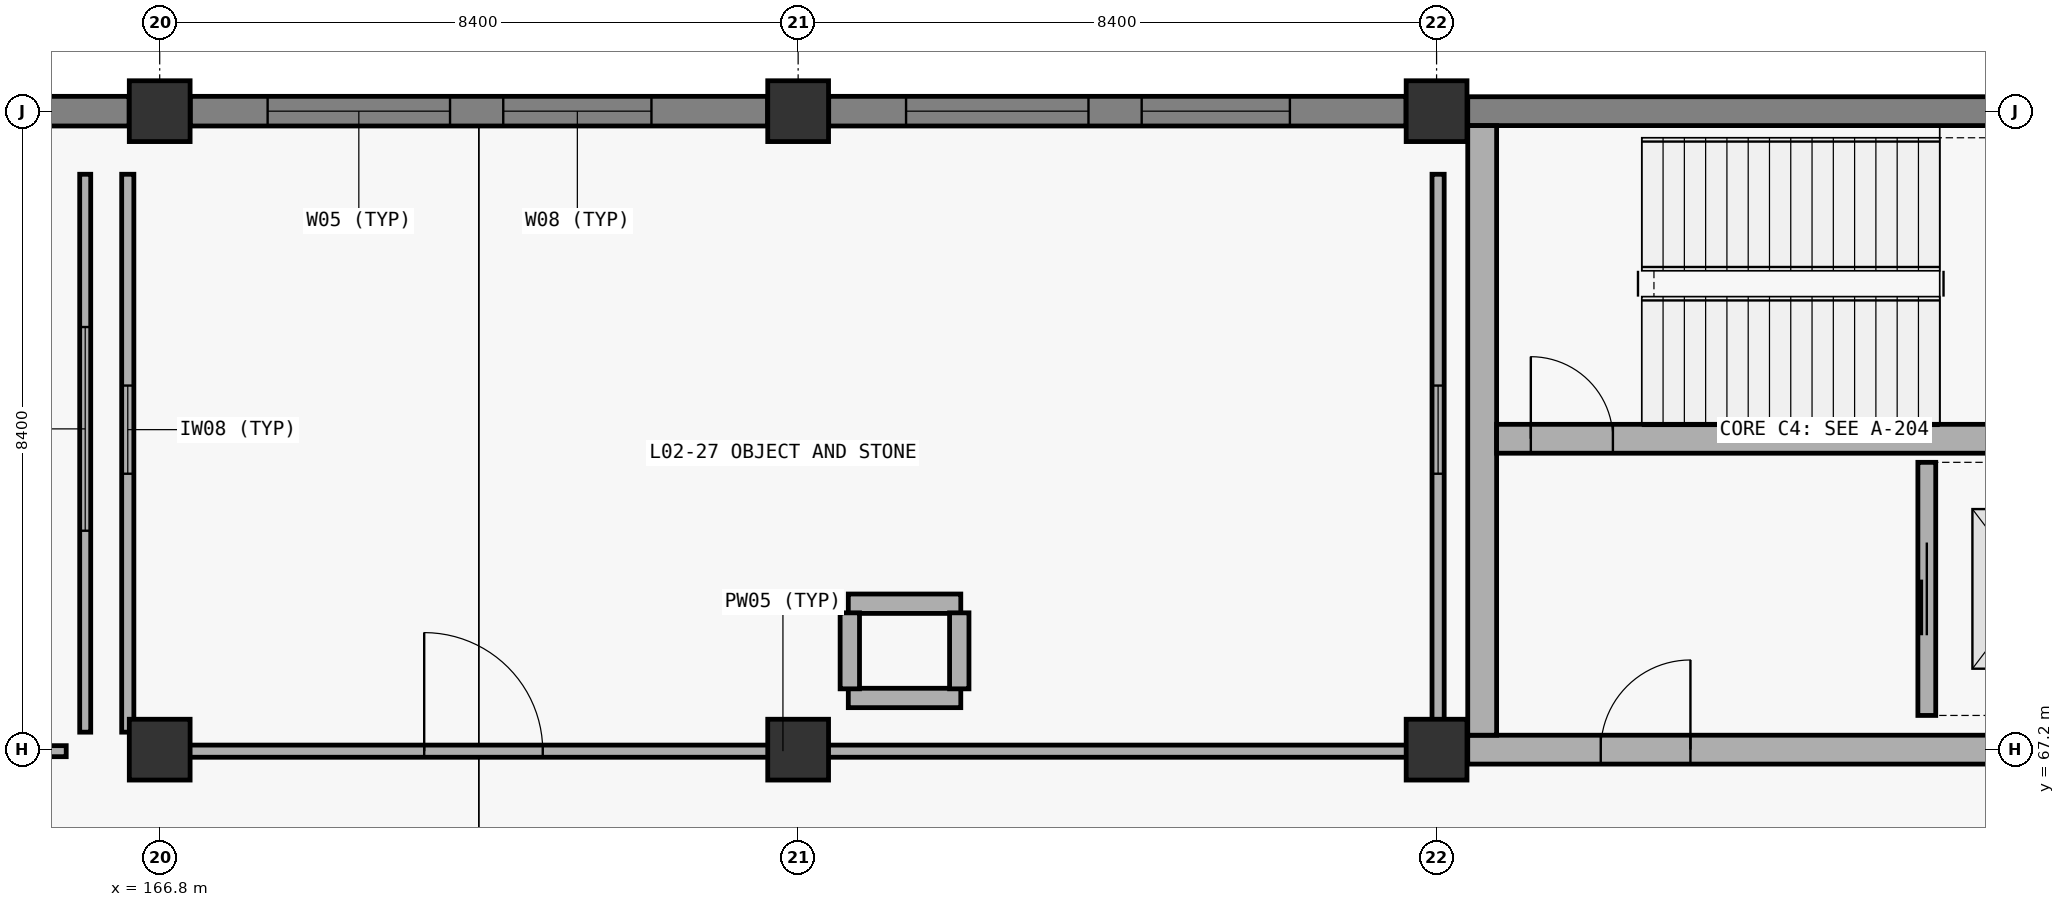
"""IFC4 building model, lengths in metres.
Left out: names, types, materials, properties, quantities, classifications, styles, units other than length and angle.
Written with IfcOpenShell. Run it as: python <this file> out.ifc"""

import sys

from ifc_helpers import new_model, si_unit, direction, frame, frame_2d, origin, origin_2d, place, context, subcontext, project, spatial, rectangle, extrude, element, fill, save


model = new_model("IFC4")
c1 = context("Model", 3, precision=1e-05, world=origin(), true_north=direction((0.0, 1.0)))
c2 = subcontext(c1, "Body", "Model", "MODEL_VIEW")
j1 = project(units=[si_unit("LENGTHUNIT", "METRE"), si_unit("PLANEANGLEUNIT", "RADIAN")], contexts=[c1])
p1 = place(None, origin())
s1 = spatial("IfcSite", under=j1, at=p1, CompositionType="ELEMENT")
p2 = place(p1, origin())
s2 = spatial("IfcBuilding", under=s1, at=p2, CompositionType="ELEMENT")
p3 = place(p2, frame((0.0, 0.0, 10.5)))
s3 = spatial("IfcBuildingStorey", under=s2, at=p3, CompositionType="ELEMENT", Elevation=10.5)
for number, where, z_axis, x_axis in (
    (1, (166.8, 67.2, 0.0), (0.0, 0.0, 1.0), (1.0, 0.0, 0.0)),
    (2, (166.8, 75.6, 0.0), (0.0, 0.0, 1.0), (1.0, 0.0, 0.0)),
    (3, (175.2, 67.2, 0.0), (0.0, 0.0, 1.0), (1.0, 0.0, 0.0)),
    (4, (175.2, 75.6, 0.0), (0.0, 0.0, 1.0), (1.0, 0.0, 0.0)),
    (5, (183.6, 67.2, 0.0), (0.0, 0.0, 1.0), (1.0, 0.0, 0.0)),
    (6, (183.6, 75.6, 0.0), (0.0, 0.0, 1.0), (1.0, 0.0, 0.0)),
):
    element("IfcColumn", number, at=place(p3, frame(where, z_axis=z_axis, x_axis=x_axis)), inside=s3, PredefinedType="COLUMN", context=c2, shape_type="SweptSolid", body=[
        extrude(rectangle(XDim=0.8, YDim=0.8, at=origin_2d()), origin(), (0.0, 0.0, 1.0), 5.1),
    ])
p4 = place(p3, frame((184.01, 67.2, 0.0), z_axis=(0.0, 0.0, 1.0), x_axis=(1.0, 0.0, 0.0)))
e7 = element("IfcWall", 7, at=p4, inside=s3, PredefinedType="SHEAR", context=c2, shape_type="SweptSolid", body=[
    extrude(rectangle(XDim=9.38, YDim=0.38, at=frame_2d((4.69, 0.0))), origin(), (0.0, 0.0, 1.0), 5.1),
])
p5 = place(p4, frame((1.75, 0.0, 0.0)))
e8 = element("IfcOpeningElement", 8, at=p5, cuts=e7, PredefinedType="OPENING", context=c2, shape_type="SweptSolid", body=[
    extrude(rectangle(XDim=1.18, YDim=2.24, at=frame_2d((0.59, 1.12))), frame((0.0, 0.2, 0.0), z_axis=(0.0, -1.0, 0.0), x_axis=(1.0, 0.0, 0.0)), (0.0, 0.0, 1.0), 0.4),
])
p6 = place(p3, frame((184.01, 75.6, 0.0), z_axis=(0.0, 0.0, 1.0), x_axis=(1.0, 0.0, 0.0)))
e9 = element("IfcWall", 9, at=p6, inside=s3, PredefinedType="SHEAR", context=c2, shape_type="SweptSolid", body=[
    extrude(rectangle(XDim=9.38, YDim=0.38, at=frame_2d((4.69, 0.0))), origin(), (0.0, 0.0, 1.0), 5.1),
])
p7 = place(p3, frame((184.2, 67.39, 0.0), z_axis=(0.0, 0.0, 1.0), x_axis=(0.0, 1.0, 0.0)))
e10 = element("IfcWall", 10, at=p7, inside=s3, PredefinedType="SHEAR", context=c2, shape_type="SweptSolid", body=[
    extrude(rectangle(XDim=8.02, YDim=0.38, at=frame_2d((4.01, 0.0))), origin(), (0.0, 0.0, 1.0), 5.1),
])
p8 = place(p3, frame((184.39, 71.29, 0.0), z_axis=(0.0, 0.0, 1.0), x_axis=(1.0, 0.0, 0.0)))
e11 = element("IfcWall", 11, at=p8, inside=s3, PredefinedType="SHEAR", context=c2, shape_type="SweptSolid", body=[
    extrude(rectangle(XDim=8.62, YDim=0.38, at=frame_2d((4.31, 0.0))), origin(), (0.0, 0.0, 1.0), 5.1),
])
p9 = place(p8, frame((0.45, 0.0, 0.0)))
e12 = element("IfcOpeningElement", 12, at=p9, cuts=e11, PredefinedType="OPENING", context=c2, shape_type="SweptSolid", body=[
    extrude(rectangle(XDim=1.08, YDim=2.18, at=frame_2d((0.54, 1.09))), frame((0.0, 0.2, 0.0), z_axis=(0.0, -1.0, 0.0), x_axis=(1.0, 0.0, 0.0)), (0.0, 0.0, 1.0), 0.4),
])
p10 = place(p3, frame((158.802, 75.6, 0.0), z_axis=(0.0, 0.0, 1.0), x_axis=(1.0, 0.0, 0.0)))
e13 = element("IfcWall", 13, at=p10, inside=s3, PredefinedType="SOLIDWALL", context=c2, shape_type="SweptSolid", body=[
    extrude(rectangle(XDim=7.596, YDim=0.39, at=frame_2d((3.798, 0.0))), origin(), (0.0, 0.0, 1.0), 4.35),
])
p11 = place(p10, frame((1.018, 0.0, 0.85)))
e14 = element("IfcOpeningElement", 14, at=p11, cuts=e13, PredefinedType="OPENING", context=c2, shape_type="SweptSolid", body=[
    extrude(rectangle(XDim=2.4, YDim=2.15, at=frame_2d((1.2, 1.075))), frame((0.0, 0.205, 0.0), z_axis=(0.0, -1.0, 0.0), x_axis=(1.0, 0.0, 0.0)), (0.0, 0.0, 1.0), 0.41),
])
p12 = place(p10, frame((4.118, 0.0, 0.85)))
e15 = element("IfcOpeningElement", 15, at=p12, cuts=e13, PredefinedType="OPENING", context=c2, shape_type="SweptSolid", body=[
    extrude(rectangle(XDim=1.95, YDim=2.3, at=frame_2d((0.975, 1.15))), frame((0.0, 0.205, 0.0), z_axis=(0.0, -1.0, 0.0), x_axis=(1.0, 0.0, 0.0)), (0.0, 0.0, 1.0), 0.41),
])
p13 = place(p3, frame((167.202, 75.6, 0.0), z_axis=(0.0, 0.0, 1.0), x_axis=(1.0, 0.0, 0.0)))
e16 = element("IfcWall", 16, at=p13, inside=s3, PredefinedType="SOLIDWALL", context=c2, shape_type="SweptSolid", body=[
    extrude(rectangle(XDim=7.596, YDim=0.39, at=frame_2d((3.798, 0.0))), origin(), (0.0, 0.0, 1.0), 4.1),
])
p14 = place(p13, frame((1.018, 0.0, 0.85)))
e17 = element("IfcOpeningElement", 17, at=p14, cuts=e16, PredefinedType="OPENING", context=c2, shape_type="SweptSolid", body=[
    extrude(rectangle(XDim=2.4, YDim=2.15, at=frame_2d((1.2, 1.075))), frame((0.0, 0.205, 0.0), z_axis=(0.0, -1.0, 0.0), x_axis=(1.0, 0.0, 0.0)), (0.0, 0.0, 1.0), 0.41),
])
p15 = place(p13, frame((4.118, 0.0, 0.85)))
e18 = element("IfcOpeningElement", 18, at=p15, cuts=e16, PredefinedType="OPENING", context=c2, shape_type="SweptSolid", body=[
    extrude(rectangle(XDim=1.95, YDim=2.3, at=frame_2d((0.975, 1.15))), frame((0.0, 0.205, 0.0), z_axis=(0.0, -1.0, 0.0), x_axis=(1.0, 0.0, 0.0)), (0.0, 0.0, 1.0), 0.41),
])
p16 = place(p3, frame((175.602, 75.6, 0.0), z_axis=(0.0, 0.0, 1.0), x_axis=(1.0, 0.0, 0.0)))
e19 = element("IfcWall", 19, at=p16, inside=s3, PredefinedType="SOLIDWALL", context=c2, shape_type="SweptSolid", body=[
    extrude(rectangle(XDim=7.596, YDim=0.39, at=frame_2d((3.798, 0.0))), origin(), (0.0, 0.0, 1.0), 4.35),
])
p17 = place(p16, frame((1.018, 0.0, 0.85)))
e20 = element("IfcOpeningElement", 20, at=p17, cuts=e19, PredefinedType="OPENING", context=c2, shape_type="SweptSolid", body=[
    extrude(rectangle(XDim=2.4, YDim=2.15, at=frame_2d((1.2, 1.075))), frame((0.0, 0.205, 0.0), z_axis=(0.0, -1.0, 0.0), x_axis=(1.0, 0.0, 0.0)), (0.0, 0.0, 1.0), 0.41),
])
p18 = place(p16, frame((4.118, 0.0, 0.85)))
e21 = element("IfcOpeningElement", 21, at=p18, cuts=e19, PredefinedType="OPENING", context=c2, shape_type="SweptSolid", body=[
    extrude(rectangle(XDim=1.95, YDim=2.3, at=frame_2d((0.975, 1.15))), frame((0.0, 0.205, 0.0), z_axis=(0.0, -1.0, 0.0), x_axis=(1.0, 0.0, 0.0)), (0.0, 0.0, 1.0), 0.41),
])
p19 = place(p3, frame((190.05, 67.65, 0.0), z_axis=(0.0, 0.0, 1.0), x_axis=(0.0, 1.0, 0.0)))
e22 = element("IfcWall", 22, at=p19, inside=s3, PredefinedType="PARTITIONING", context=c2, shape_type="SweptSolid", body=[
    extrude(rectangle(XDim=3.33, YDim=0.235, at=frame_2d((1.665, 0.0))), origin(), (0.0, 0.0, 1.0), 4.72),
])
p20 = place(p19, frame((1.055, 0.0, 0.0)))
e23 = element("IfcOpeningElement", 23, at=p20, cuts=e22, PredefinedType="OPENING", context=c2, shape_type="SweptSolid", body=[
    extrude(rectangle(XDim=1.22, YDim=2.24, at=frame_2d((0.61, 1.12))), frame((0.0, 0.127, 0.0), z_axis=(0.0, -1.0, 0.0), x_axis=(1.0, 0.0, 0.0)), (0.0, 0.0, 1.0), 0.255),
])
for number, where, z_axis, x_axis in (
    (24, (175.86, 69.12, 0.0), (0.0, 0.0, 1.0), (1.0, 0.0, 0.0)),
    (25, (175.86, 67.88, 0.0), (0.0, 0.0, 1.0), (1.0, 0.0, 0.0)),
):
    element("IfcWall", number, at=place(p3, frame(where, z_axis=z_axis, x_axis=x_axis)), inside=s3, PredefinedType="PARTITIONING", context=c2, shape_type="SweptSolid", body=[
        extrude(rectangle(XDim=1.48, YDim=0.255, at=frame_2d((0.74, 0.0))), origin(), (0.0, 0.0, 1.0), 4.72),
    ])
for number, where, z_axis, x_axis in (
    (26, (175.88, 68.0, 0.0), (0.0, 0.0, 1.0), (0.0, 1.0, 0.0)),
    (27, (177.32, 68.0, 0.0), (0.0, 0.0, 1.0), (0.0, 1.0, 0.0)),
):
    element("IfcWall", number, at=place(p3, frame(where, z_axis=z_axis, x_axis=x_axis)), inside=s3, PredefinedType="PARTITIONING", context=c2, shape_type="SweptSolid", body=[
        extrude(rectangle(XDim=1.0, YDim=0.255, at=frame_2d((0.5, 0.0))), origin(), (0.0, 0.0, 1.0), 4.72),
    ])
p21 = place(p3, frame((142.43, 67.18, 0.0), z_axis=(0.0, 0.0, 1.0), x_axis=(1.0, 0.0, 0.0)))
e28 = element("IfcWall", 28, at=p21, inside=s3, PredefinedType="PARTITIONING", context=c2, shape_type="SweptSolid", body=[
    extrude(rectangle(XDim=23.14, YDim=0.145, at=frame_2d((11.57, 0.0))), origin(), (0.0, 0.0, 1.0), 3.9),
])
p22 = place(p21, frame((2.65, 0.0, 0.0)))
e29 = element("IfcOpeningElement", 29, at=p22, cuts=e28, PredefinedType="OPENING", context=c2, shape_type="SweptSolid", body=[
    extrude(rectangle(XDim=1.42, YDim=2.4, at=frame_2d((0.71, 1.2))), frame((0.0, 0.083, 0.0), z_axis=(0.0, -1.0, 0.0), x_axis=(1.0, 0.0, 0.0)), (0.0, 0.0, 1.0), 0.165),
])
p23 = place(p3, frame((165.82, 67.43, 0.0), z_axis=(0.0, 0.0, 1.0), x_axis=(0.0, 1.0, 0.0)))
e30 = element("IfcWall", 30, at=p23, inside=s3, PredefinedType="PARTITIONING", context=c2, shape_type="SweptSolid", body=[
    extrude(rectangle(XDim=7.34, YDim=0.145, at=frame_2d((3.67, 0.0))), origin(), (0.0, 0.0, 1.0), 4.0),
])
p24 = place(p23, frame((2.65, 0.0, 0.9)))
e31 = element("IfcOpeningElement", 31, at=p24, cuts=e30, PredefinedType="OPENING", context=c2, shape_type="SweptSolid", body=[
    extrude(rectangle(XDim=2.68, YDim=1.52, at=frame_2d((1.34, 0.76))), frame((0.0, 0.083, 0.0), z_axis=(0.0, -1.0, 0.0), x_axis=(1.0, 0.0, 0.0)), (0.0, 0.0, 1.0), 0.165),
])
p25 = place(p3, frame((166.63, 67.18, 0.0), z_axis=(0.0, 0.0, 1.0), x_axis=(1.0, 0.0, 0.0)))
e32 = element("IfcWall", 32, at=p25, inside=s3, PredefinedType="PARTITIONING", context=c2, shape_type="SweptSolid", body=[
    extrude(rectangle(XDim=16.74, YDim=0.16, at=frame_2d((8.37, 0.0))), origin(), (0.0, 0.0, 1.0), 3.9),
])
p26 = place(p25, frame((3.65, 0.0, 0.0)))
e33 = element("IfcOpeningElement", 33, at=p26, cuts=e32, PredefinedType="OPENING", context=c2, shape_type="SweptSolid", body=[
    extrude(rectangle(XDim=1.56, YDim=2.26, at=frame_2d((0.78, 1.13))), frame((0.0, 0.09, 0.0), z_axis=(0.0, -1.0, 0.0), x_axis=(1.0, 0.0, 0.0)), (0.0, 0.0, 1.0), 0.18),
])
p27 = place(p3, frame((166.38, 67.43, 0.0), z_axis=(0.0, 0.0, 1.0), x_axis=(0.0, 1.0, 0.0)))
e34 = element("IfcWall", 34, at=p27, inside=s3, PredefinedType="PARTITIONING", context=c2, shape_type="SweptSolid", body=[
    extrude(rectangle(XDim=7.34, YDim=0.16, at=frame_2d((3.67, 0.0))), origin(), (0.0, 0.0, 1.0), 4.0),
])
p28 = place(p27, frame((3.4, 0.0, 0.9)))
e35 = element("IfcOpeningElement", 35, at=p28, cuts=e34, PredefinedType="OPENING", context=c2, shape_type="SweptSolid", body=[
    extrude(rectangle(XDim=1.16, YDim=1.62, at=frame_2d((0.58, 0.81))), frame((0.0, 0.09, 0.0), z_axis=(0.0, -1.0, 0.0), x_axis=(1.0, 0.0, 0.0)), (0.0, 0.0, 1.0), 0.18),
])
p29 = place(p3, frame((183.62, 67.43, 0.0), z_axis=(0.0, 0.0, 1.0), x_axis=(0.0, 1.0, 0.0)))
e36 = element("IfcWall", 36, at=p29, inside=s3, PredefinedType="PARTITIONING", context=c2, shape_type="SweptSolid", body=[
    extrude(rectangle(XDim=7.34, YDim=0.16, at=frame_2d((3.67, 0.0))), origin(), (0.0, 0.0, 1.0), 3.9),
])
p30 = place(p29, frame((3.4, 0.0, 0.9)))
e37 = element("IfcOpeningElement", 37, at=p30, cuts=e36, PredefinedType="OPENING", context=c2, shape_type="SweptSolid", body=[
    extrude(rectangle(XDim=1.16, YDim=1.62, at=frame_2d((0.58, 0.81))), frame((0.0, 0.09, 0.0), z_axis=(0.0, -1.0, 0.0), x_axis=(1.0, 0.0, 0.0)), (0.0, 0.0, 1.0), 0.18),
])
p31 = place(p14, origin())
e38 = element("IfcWindow", 38, at=p31, inside=s3, PartitioningType="SINGLE_PANEL", PredefinedType="WINDOW", context=c2, shape_type="SweptSolid", body=[
    extrude(rectangle(XDim=2.4, YDim=2.15, at=frame_2d((1.2, 1.075))), frame((0.0, 0.03, 0.0), z_axis=(0.0, -1.0, 0.0), x_axis=(1.0, 0.0, 0.0)), (0.0, 0.0, 1.0), 0.06),
])
fill(e17, e38)
p32 = place(p15, origin())
e39 = element("IfcWindow", 39, at=p32, inside=s3, PartitioningType="SINGLE_PANEL", PredefinedType="WINDOW", context=c2, shape_type="SweptSolid", body=[
    extrude(rectangle(XDim=1.95, YDim=2.3, at=frame_2d((0.975, 1.15))), frame((0.0, 0.03, 0.0), z_axis=(0.0, -1.0, 0.0), x_axis=(1.0, 0.0, 0.0)), (0.0, 0.0, 1.0), 0.06),
])
fill(e18, e39)
p33 = place(p17, origin())
e40 = element("IfcWindow", 40, at=p33, inside=s3, PartitioningType="SINGLE_PANEL", PredefinedType="WINDOW", context=c2, shape_type="SweptSolid", body=[
    extrude(rectangle(XDim=2.4, YDim=2.15, at=frame_2d((1.2, 1.075))), frame((0.0, 0.03, 0.0), z_axis=(0.0, -1.0, 0.0), x_axis=(1.0, 0.0, 0.0)), (0.0, 0.0, 1.0), 0.06),
])
fill(e20, e40)
p34 = place(p18, origin())
e41 = element("IfcWindow", 41, at=p34, inside=s3, PartitioningType="SINGLE_PANEL", PredefinedType="WINDOW", context=c2, shape_type="SweptSolid", body=[
    extrude(rectangle(XDim=1.95, YDim=2.3, at=frame_2d((0.975, 1.15))), frame((0.0, 0.03, 0.0), z_axis=(0.0, -1.0, 0.0), x_axis=(1.0, 0.0, 0.0)), (0.0, 0.0, 1.0), 0.06),
])
fill(e21, e41)
p35 = place(p9, origin())
e42 = element("IfcDoor", 42, at=p35, inside=s3, OperationType="SINGLE_SWING_LEFT", PredefinedType="DOOR", context=c2, shape_type="SweptSolid", body=[
    extrude(rectangle(XDim=1.08, YDim=2.18, at=frame_2d((0.54, 1.09))), frame((0.0, 0.025, 0.0), z_axis=(0.0, -1.0, 0.0), x_axis=(1.0, 0.0, 0.0)), (0.0, 0.0, 1.0), 0.05),
])
fill(e12, e42)
p36 = place(p5, origin())
e43 = element("IfcDoor", 43, at=p36, inside=s3, OperationType="SINGLE_SWING_RIGHT", PredefinedType="DOOR", context=c2, shape_type="SweptSolid", body=[
    extrude(rectangle(XDim=1.18, YDim=2.24, at=frame_2d((0.59, 1.12))), frame((0.0, 0.025, 0.0), z_axis=(0.0, -1.0, 0.0), x_axis=(1.0, 0.0, 0.0)), (0.0, 0.0, 1.0), 0.05),
])
fill(e8, e43)
p37 = place(p20, origin())
e44 = element("IfcDoor", 44, at=p37, inside=s3, OperationType="SLIDING_TO_RIGHT", PredefinedType="DOOR", context=c2, shape_type="SweptSolid", body=[
    extrude(rectangle(XDim=1.22, YDim=2.24, at=frame_2d((0.61, 1.12))), frame((0.0, 0.025, 0.0), z_axis=(0.0, -1.0, 0.0), x_axis=(1.0, 0.0, 0.0)), (0.0, 0.0, 1.0), 0.05),
])
fill(e23, e44)
p38 = place(p24, origin())
e45 = element("IfcWindow", 45, at=p38, inside=s3, PartitioningType="SINGLE_PANEL", PredefinedType="WINDOW", context=c2, shape_type="SweptSolid", body=[
    extrude(rectangle(XDim=2.68, YDim=1.52, at=frame_2d((1.34, 0.76))), frame((0.0, 0.03, 0.0), z_axis=(0.0, -1.0, 0.0), x_axis=(1.0, 0.0, 0.0)), (0.0, 0.0, 1.0), 0.06),
])
fill(e31, e45)
p39 = place(p26, origin())
e46 = element("IfcDoor", 46, at=p39, inside=s3, OperationType="DOUBLE_SWING_LEFT", PredefinedType="DOOR", context=c2, shape_type="SweptSolid", body=[
    extrude(rectangle(XDim=1.56, YDim=2.26, at=frame_2d((0.78, 1.13))), frame((0.0, 0.025, 0.0), z_axis=(0.0, -1.0, 0.0), x_axis=(1.0, 0.0, 0.0)), (0.0, 0.0, 1.0), 0.05),
])
fill(e33, e46)
p40 = place(p28, origin())
e47 = element("IfcWindow", 47, at=p40, inside=s3, PartitioningType="SINGLE_PANEL", PredefinedType="WINDOW", context=c2, shape_type="SweptSolid", body=[
    extrude(rectangle(XDim=1.16, YDim=1.62, at=frame_2d((0.58, 0.81))), frame((0.0, 0.03, 0.0), z_axis=(0.0, -1.0, 0.0), x_axis=(1.0, 0.0, 0.0)), (0.0, 0.0, 1.0), 0.06),
])
fill(e35, e47)
p41 = place(p30, origin())
e48 = element("IfcWindow", 48, at=p41, inside=s3, PartitioningType="SINGLE_PANEL", PredefinedType="WINDOW", context=c2, shape_type="SweptSolid", body=[
    extrude(rectangle(XDim=1.16, YDim=1.62, at=frame_2d((0.58, 0.81))), frame((0.0, 0.03, 0.0), z_axis=(0.0, -1.0, 0.0), x_axis=(1.0, 0.0, 0.0)), (0.0, 0.0, 1.0), 0.06),
])
fill(e37, e48)
save(model, sys.argv[1])
